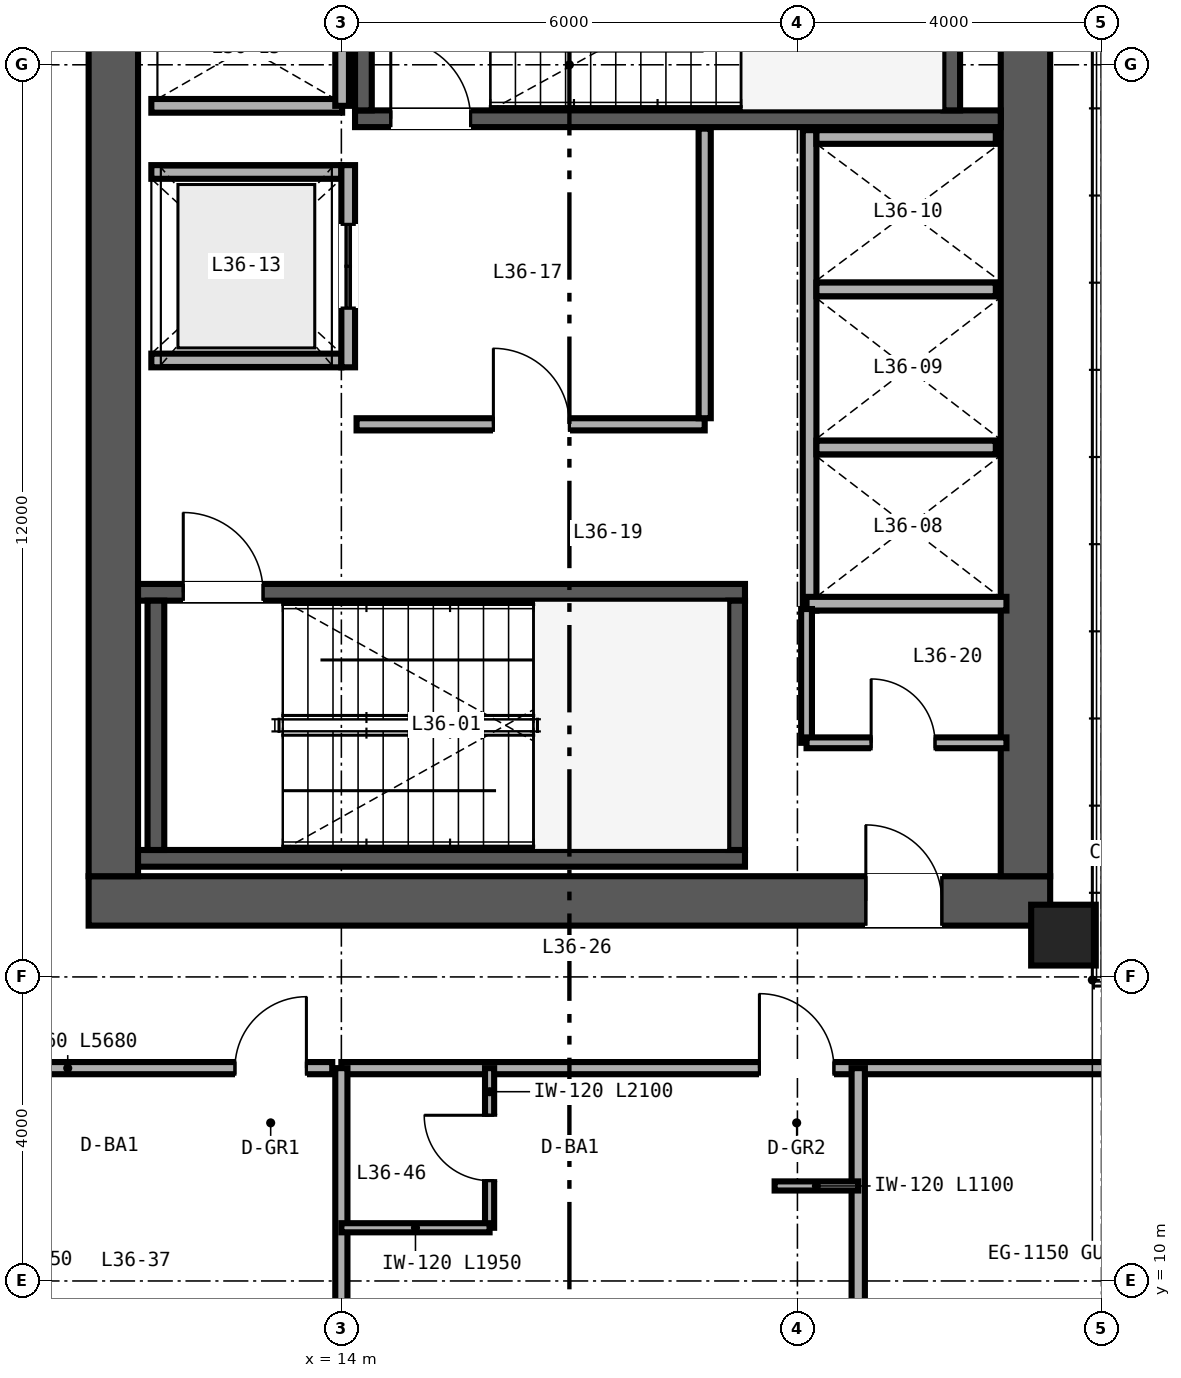
"""IFC4 building model, lengths in metres.
Left out: names, types, materials, properties, quantities, classifications, styles, units other than length and angle.
Written with IfcOpenShell. Run it as: python <this file> out.ifc"""

import sys

from ifc_helpers import new_model, si_unit, direction, frame, frame_2d, origin, origin_2d, place, context, subcontext, project, spatial, rectangle, hollow_rectangle, extrude, source, transform, mapped, element, fill, save


model = new_model("IFC4")
c1 = context("Model", 3, precision=1e-05, world=origin(), true_north=direction((0.0, 1.0)))
c2 = subcontext(c1, "Body", "Model", "MODEL_VIEW")
j1 = project(units=[si_unit("LENGTHUNIT", "METRE"), si_unit("PLANEANGLEUNIT", "RADIAN")], contexts=[c1])
p1 = place(None, origin())
s1 = spatial("IfcSite", under=j1, at=p1, CompositionType="ELEMENT")
p2 = place(p1, origin())
s2 = spatial("IfcBuilding", under=s1, at=p2, CompositionType="ELEMENT")
p3 = place(p2, frame((0.0, 0.0, 144.0)))
s3 = spatial("IfcBuildingStorey", under=s2, at=p3, CompositionType="ELEMENT", Elevation=144.0)
p4 = place(p3, frame((10.675, 15.0, 0.0), z_axis=(0.0, 0.0, 1.0), x_axis=(1.0, 0.0, 0.0)))
e1 = element("IfcWall", 1, at=p4, inside=s3, PredefinedType="SHEAR", context=c2, shape_type="SweptSolid", body=[
    extrude(rectangle(XDim=12.65, YDim=0.65, at=frame_2d((6.325, 0.0))), origin(), (0.0, 0.0, 1.0), 3.36),
])
p5 = place(p4, frame((10.225, 0.0, 0.0)))
e2 = element("IfcOpeningElement", 2, at=p5, cuts=e1, PredefinedType="OPENING", context=c2, shape_type="SweptSolid", body=[
    extrude(rectangle(XDim=1.0, YDim=2.15, at=frame_2d((0.5, 1.075))), frame((0.0, 0.335, 0.0), z_axis=(0.0, -1.0, 0.0), x_axis=(1.0, 0.0, 0.0)), (0.0, 0.0, 1.0), 0.67),
])
for number, where, z_axis, x_axis in (
    (3, (11.0, 15.325, 0.0), (0.0, 0.0, 1.0), (0.0, 1.0, 0.0)),
    (4, (23.0, 15.325, 0.0), (0.0, 0.0, 1.0), (0.0, 1.0, 0.0)),
):
    element("IfcWall", number, at=place(p3, frame(where, z_axis=z_axis, x_axis=x_axis)), inside=s3, PredefinedType="SHEAR", context=c2, shape_type="SweptSolid", body=[
        extrude(rectangle(XDim=21.35, YDim=0.65, at=frame_2d((10.675, 0.0))), origin(), (0.0, 0.0, 1.0), 3.36),
    ])
p6 = place(p3, frame((11.325, 15.56, 0.0), z_axis=(0.0, 0.0, 1.0), x_axis=(1.0, 0.0, 0.0)))
e5 = element("IfcWall", 5, at=p6, inside=s3, PredefinedType="SHEAR", context=c2, shape_type="SweptSolid", body=[
    extrude(rectangle(XDim=7.985, YDim=0.22, at=frame_2d((3.993, 0.0))), origin(), (0.0, 0.0, 1.0), 3.4),
])
p7 = place(p3, frame((11.325, 19.06, 0.0), z_axis=(0.0, 0.0, 1.0), x_axis=(1.0, 0.0, 0.0)))
e6 = element("IfcWall", 6, at=p7, inside=s3, PredefinedType="SHEAR", context=c2, shape_type="SweptSolid", body=[
    extrude(rectangle(XDim=7.985, YDim=0.22, at=frame_2d((3.993, 0.0))), origin(), (0.0, 0.0, 1.0), 3.4),
])
p8 = place(p7, frame((0.595, 0.0, 0.0)))
e7 = element("IfcOpeningElement", 7, at=p8, cuts=e6, PredefinedType="OPENING", context=c2, shape_type="SweptSolid", body=[
    extrude(rectangle(XDim=1.05, YDim=2.15, at=frame_2d((0.525, 1.075))), frame((0.0, 0.12, 0.0), z_axis=(0.0, -1.0, 0.0), x_axis=(1.0, 0.0, 0.0)), (0.0, 0.0, 1.0), 0.24),
])
for number, where, z_axis, x_axis in (
    (8, (11.56, 15.67, 0.0), (0.0, 0.0, 1.0), (0.0, 1.0, 0.0)),
    (9, (19.2, 15.67, 0.0), (0.0, 0.0, 1.0), (0.0, 1.0, 0.0)),
):
    element("IfcWall", number, at=place(p3, frame(where, z_axis=z_axis, x_axis=x_axis)), inside=s3, PredefinedType="SHEAR", context=c2, shape_type="SweptSolid", body=[
        extrude(rectangle(XDim=3.28, YDim=0.22, at=frame_2d((1.64, 0.0))), origin(), (0.0, 0.0, 1.0), 3.4),
    ])
p9 = place(p3, frame((14.18, 25.29, 0.0), z_axis=(0.0, 0.0, 1.0), x_axis=(1.0, 0.0, 0.0)))
e10 = element("IfcWall", 10, at=p9, inside=s3, PredefinedType="SHEAR", context=c2, shape_type="SweptSolid", body=[
    extrude(rectangle(XDim=8.495, YDim=0.22, at=frame_2d((4.248, 0.0))), origin(), (0.0, 0.0, 1.0), 3.4),
])
p10 = place(p9, frame((0.47, 0.0, 0.0)))
e11 = element("IfcOpeningElement", 11, at=p10, cuts=e10, PredefinedType="OPENING", context=c2, shape_type="SweptSolid", body=[
    extrude(rectangle(XDim=1.05, YDim=2.15, at=frame_2d((0.525, 1.075))), frame((0.0, 0.12, 0.0), z_axis=(0.0, -1.0, 0.0), x_axis=(1.0, 0.0, 0.0)), (0.0, 0.0, 1.0), 0.24),
])
for number, where, z_axis, x_axis in (
    (12, (14.29, 25.4, 0.0), (0.0, 0.0, 1.0), (0.0, 1.0, 0.0)),
    (13, (22.03, 25.4, 0.0), (0.0, 0.0, 1.0), (0.0, 1.0, 0.0)),
):
    element("IfcWall", number, at=place(p3, frame(where, z_axis=z_axis, x_axis=x_axis)), inside=s3, PredefinedType="SHEAR", context=c2, shape_type="SweptSolid", body=[
        extrude(rectangle(XDim=3.28, YDim=0.22, at=frame_2d((1.64, 0.0))), origin(), (0.0, 0.0, 1.0), 3.4),
    ])
m1 = source(origin(), c2, "Body", "SweptSolid", [
    extrude(hollow_rectangle(XDim=0.85, YDim=0.8, WallThickness=0.032, at=origin_2d()), origin(), (0.0, 0.0, 1.0), 3.36),
])
p11 = place(p3, frame((23.5, 14.55, 0.0), z_axis=(0.0, 0.0, 1.0), x_axis=(1.0, 0.0, 0.0)))
e14 = element("IfcColumn", 14, at=p11, inside=s3, PredefinedType="COLUMN", context=c2, shape_type="MappedRepresentation", body=[
    mapped(m1, transform((0.0, 0.0, 0.0), scale=1.0)),
])
p12 = place(p3, frame((20.16, 18.82, 0.0), z_axis=(0.0, 0.0, 1.0), x_axis=(0.0, 1.0, 0.0)))
e15 = element("IfcWall", 15, at=p12, inside=s3, PredefinedType="SOLIDWALL", context=c2, shape_type="SweptSolid", body=[
    extrude(rectangle(XDim=6.32, YDim=0.18, at=frame_2d((3.16, 0.0))), origin(), (0.0, 0.0, 1.0), 2.36),
])
p13 = place(p3, frame((20.12, 18.91, 0.0), z_axis=(0.0, 0.0, 1.0), x_axis=(1.0, 0.0, 0.0)))
e16 = element("IfcWall", 16, at=p13, inside=s3, PredefinedType="SOLIDWALL", context=c2, shape_type="SweptSolid", body=[
    extrude(rectangle(XDim=2.63, YDim=0.18, at=frame_2d((1.315, 0.0))), origin(), (0.0, 0.0, 1.0), 3.36),
])
p14 = place(p3, frame((20.25, 25.05, 0.0), z_axis=(0.0, 0.0, 1.0), x_axis=(1.0, 0.0, 0.0)))
e17 = element("IfcWall", 17, at=p14, inside=s3, PredefinedType="SOLIDWALL", context=c2, shape_type="SweptSolid", body=[
    extrude(rectangle(XDim=2.36, YDim=0.18, at=frame_2d((1.18, 0.0))), origin(), (0.0, 0.0, 1.0), 3.36),
])
p15 = place(p3, frame((20.25, 20.965, 0.0), z_axis=(0.0, 0.0, 1.0), x_axis=(1.0, 0.0, 0.0)))
e18 = element("IfcWall", 18, at=p15, inside=s3, PredefinedType="SOLIDWALL", context=c2, shape_type="SweptSolid", body=[
    extrude(rectangle(XDim=2.36, YDim=0.18, at=frame_2d((1.18, 0.0))), origin(), (0.0, 0.0, 1.0), 2.36),
])
p16 = place(p3, frame((20.25, 23.045, 0.0), z_axis=(0.0, 0.0, 1.0), x_axis=(1.0, 0.0, 0.0)))
e19 = element("IfcWall", 19, at=p16, inside=s3, PredefinedType="SOLIDWALL", context=c2, shape_type="SweptSolid", body=[
    extrude(rectangle(XDim=2.36, YDim=0.18, at=frame_2d((1.18, 0.0))), origin(), (0.0, 0.0, 1.0), 3.36),
])
for number, where, z_axis, x_axis in (
    (20, (11.5, 22.11, 0.0), (0.0, 0.0, 1.0), (1.0, 0.0, 0.0)),
    (21, (11.5, 24.59, 0.0), (0.0, 0.0, 1.0), (1.0, 0.0, 0.0)),
):
    element("IfcWall", number, at=place(p3, frame(where, z_axis=z_axis, x_axis=x_axis)), inside=s3, PredefinedType="SOLIDWALL", context=c2, shape_type="SweptSolid", body=[
        extrude(rectangle(XDim=2.5, YDim=0.18, at=frame_2d((1.25, 0.0))), origin(), (0.0, 0.0, 1.0), 3.36),
    ])
p17 = place(p3, frame((14.09, 22.02, 0.0), z_axis=(0.0, 0.0, 1.0), x_axis=(0.0, 1.0, 0.0)))
e22 = element("IfcWall", 22, at=p17, inside=s3, PredefinedType="SOLIDWALL", context=c2, shape_type="SweptSolid", body=[
    extrude(rectangle(XDim=2.66, YDim=0.18, at=frame_2d((1.33, 0.0))), origin(), (0.0, 0.0, 1.0), 3.36),
])
p18 = place(p17, frame((0.78, 0.0, 0.0)))
e23 = element("IfcOpeningElement", 23, at=p18, cuts=e22, PredefinedType="OPENING", context=c2, shape_type="SweptSolid", body=[
    extrude(rectangle(XDim=1.1, YDim=2.2, at=frame_2d((0.55, 1.1))), frame((0.0, 0.1, 0.0), z_axis=(0.0, -1.0, 0.0), x_axis=(1.0, 0.0, 0.0)), (0.0, 0.0, 1.0), 0.2),
])
p19 = place(p3, frame((11.5, 25.46, 0.0), z_axis=(0.0, 0.0, 1.0), x_axis=(1.0, 0.0, 0.0)))
e24 = element("IfcWall", 24, at=p19, inside=s3, PredefinedType="SOLIDWALL", context=c2, shape_type="SweptSolid", body=[
    extrude(rectangle(XDim=2.51, YDim=0.18, at=frame_2d((1.255, 0.0))), origin(), (0.0, 0.0, 1.0), 3.36),
])
p20 = place(p3, frame((14.01, 25.46, 0.0), z_axis=(0.0, 0.0, 1.0), x_axis=(0.0, 1.0, 0.0)))
e25 = element("IfcWall", 25, at=p20, inside=s3, PredefinedType="SOLIDWALL", context=c2, shape_type="SweptSolid", body=[
    extrude(rectangle(XDim=3.08, YDim=0.18, at=frame_2d((1.54, 0.0))), origin(), (0.0, 0.0, 1.0), 3.36),
])
p21 = place(p3, frame((14.2, 21.27, 0.0), z_axis=(0.0, 0.0, 1.0), x_axis=(1.0, 0.0, 0.0)))
e26 = element("IfcWall", 26, at=p21, inside=s3, PredefinedType="PARTITIONING", context=c2, shape_type="SweptSolid", body=[
    extrude(rectangle(XDim=4.58, YDim=0.16, at=frame_2d((2.29, 0.0))), origin(), (0.0, 0.0, 1.0), 3.36),
])
p22 = place(p21, frame((1.8, 0.0, 0.0)))
e27 = element("IfcOpeningElement", 27, at=p22, cuts=e26, PredefinedType="OPENING", context=c2, shape_type="SweptSolid", body=[
    extrude(rectangle(XDim=1.0, YDim=2.15, at=frame_2d((0.5, 1.075))), frame((0.0, 0.09, 0.0), z_axis=(0.0, -1.0, 0.0), x_axis=(1.0, 0.0, 0.0)), (0.0, 0.0, 1.0), 0.18),
])
p23 = place(p3, frame((18.78, 21.35, 0.0), z_axis=(0.0, 0.0, 1.0), x_axis=(0.0, 1.0, 0.0)))
e28 = element("IfcWall", 28, at=p23, inside=s3, PredefinedType="PARTITIONING", context=c2, shape_type="SweptSolid", body=[
    extrude(rectangle(XDim=3.81, YDim=0.16, at=frame_2d((1.905, 0.0))), origin(), (0.0, 0.0, 1.0), 3.36),
])
p24 = place(p3, frame((20.12, 17.08, 0.0), z_axis=(0.0, 0.0, 1.0), x_axis=(0.0, 1.0, 0.0)))
e29 = element("IfcWall", 29, at=p24, inside=s3, PredefinedType="PARTITIONING", context=c2, shape_type="SweptSolid", body=[
    extrude(rectangle(XDim=1.76, YDim=0.142, at=frame_2d((0.88, 0.0))), origin(), (0.0, 0.0, 1.0), 3.36),
])
p25 = place(p3, frame((20.12, 17.08, 0.0), z_axis=(0.0, 0.0, 1.0), x_axis=(1.0, 0.0, 0.0)))
e30 = element("IfcWall", 30, at=p25, inside=s3, PredefinedType="PARTITIONING", context=c2, shape_type="SweptSolid", body=[
    extrude(rectangle(XDim=2.63, YDim=0.142, at=frame_2d((1.315, 0.0))), origin(), (0.0, 0.0, 1.0), 3.36),
])
p26 = place(p25, frame((0.85, 0.0, 0.0)))
e31 = element("IfcOpeningElement", 31, at=p26, cuts=e30, PredefinedType="OPENING", context=c2, shape_type="SweptSolid", body=[
    extrude(rectangle(XDim=0.84, YDim=2.1, at=frame_2d((0.42, 1.05))), frame((0.0, 0.081, 0.0), z_axis=(0.0, -1.0, 0.0), x_axis=(1.0, 0.0, 0.0)), (0.0, 0.0, 1.0), 0.162),
])
p27 = place(p3, frame((8.2, 12.8, 0.0), z_axis=(0.0, 0.0, 1.0), x_axis=(1.0, 0.0, 0.0)))
e32 = element("IfcWall", 32, at=p27, inside=s3, PredefinedType="PARTITIONING", context=c2, shape_type="SweptSolid", body=[
    extrude(rectangle(XDim=5.68, YDim=0.16, at=frame_2d((2.84, 0.0))), origin(), (0.0, 0.0, 1.0), 3.36),
])
p28 = place(p27, frame((4.4, 0.0, 0.0)))
e33 = element("IfcOpeningElement", 33, at=p28, cuts=e32, PredefinedType="OPENING", context=c2, shape_type="SweptSolid", body=[
    extrude(rectangle(XDim=0.94, YDim=2.15, at=frame_2d((0.47, 1.075))), frame((0.0, 0.09, 0.0), z_axis=(0.0, -1.0, 0.0), x_axis=(1.0, 0.0, 0.0)), (0.0, 0.0, 1.0), 0.18),
])
p29 = place(p3, frame((14.0, 12.8, 0.0), z_axis=(0.0, 0.0, 1.0), x_axis=(1.0, 0.0, 0.0)))
e34 = element("IfcWall", 34, at=p29, inside=s3, PredefinedType="PARTITIONING", context=c2, shape_type="SweptSolid", body=[
    extrude(rectangle(XDim=36.0, YDim=0.16, at=frame_2d((18.0, 0.0))), origin(), (0.0, 0.0, 1.0), 2.581),
])
p30 = place(p29, frame((5.5, 0.0, 0.0)))
e35 = element("IfcOpeningElement", 35, at=p30, cuts=e34, PredefinedType="OPENING", context=c2, shape_type="SweptSolid", body=[
    extrude(rectangle(XDim=0.98, YDim=2.2, at=frame_2d((0.49, 1.1))), frame((0.0, 0.09, 0.0), z_axis=(0.0, -1.0, 0.0), x_axis=(1.0, 0.0, 0.0)), (0.0, 0.0, 1.0), 0.18),
])
p31 = place(p29, frame((10.2, 0.0, 0.0)))
e36 = element("IfcOpeningElement", 36, at=p31, cuts=e34, PredefinedType="OPENING", context=c2, shape_type="SweptSolid", body=[
    extrude(rectangle(XDim=0.96, YDim=2.15, at=frame_2d((0.48, 1.075))), frame((0.0, 0.09, 0.0), z_axis=(0.0, -1.0, 0.0), x_axis=(1.0, 0.0, 0.0)), (0.0, 0.0, 1.0), 0.18),
])
p32 = place(p29, frame((16.72, 0.0, 0.0)))
e37 = element("IfcOpeningElement", 37, at=p32, cuts=e34, PredefinedType="OPENING", context=c2, shape_type="SweptSolid", body=[
    extrude(rectangle(XDim=0.96, YDim=2.15, at=frame_2d((0.48, 1.075))), frame((0.0, 0.09, 0.0), z_axis=(0.0, -1.0, 0.0), x_axis=(1.0, 0.0, 0.0)), (0.0, 0.0, 1.0), 0.18),
])
p33 = place(p29, frame((27.14, 0.0, 0.0)))
e38 = element("IfcOpeningElement", 38, at=p33, cuts=e34, PredefinedType="OPENING", context=c2, shape_type="SweptSolid", body=[
    extrude(rectangle(XDim=0.94, YDim=2.15, at=frame_2d((0.47, 1.075))), frame((0.0, 0.09, 0.0), z_axis=(0.0, -1.0, 0.0), x_axis=(1.0, 0.0, 0.0)), (0.0, 0.0, 1.0), 0.18),
])
p34 = place(p29, frame((34.74, 0.0, 0.0)))
e39 = element("IfcOpeningElement", 39, at=p34, cuts=e34, PredefinedType="OPENING", context=c2, shape_type="SweptSolid", body=[
    extrude(rectangle(XDim=0.94, YDim=2.15, at=frame_2d((0.47, 1.075))), frame((0.0, 0.09, 0.0), z_axis=(0.0, -1.0, 0.0), x_axis=(1.0, 0.0, 0.0)), (0.0, 0.0, 1.0), 0.18),
])
p35 = place(p3, frame((14.0, 2.36, 0.0), z_axis=(0.0, 0.0, 1.0), x_axis=(0.0, 1.0, 0.0)))
e40 = element("IfcWall", 40, at=p35, inside=s3, PredefinedType="PARTITIONING", context=c2, shape_type="SweptSolid", body=[
    extrude(rectangle(XDim=10.44, YDim=0.16, at=frame_2d((5.22, 0.0))), origin(), (0.0, 0.0, 1.0), 2.667),
])
p36 = place(p3, frame((20.8, 2.36, 0.0), z_axis=(0.0, 0.0, 1.0), x_axis=(0.0, 1.0, 0.0)))
e41 = element("IfcWall", 41, at=p36, inside=s3, PredefinedType="PARTITIONING", context=c2, shape_type="SweptSolid", body=[
    extrude(rectangle(XDim=10.44, YDim=0.175, at=frame_2d((5.22, 0.0))), origin(), (0.0, 0.0, 1.0), 2.823),
])
p37 = place(p3, frame((15.95, 10.7, 0.0), z_axis=(0.0, 0.0, 1.0), x_axis=(0.0, 1.0, 0.0)))
e42 = element("IfcWall", 42, at=p37, inside=s3, PredefinedType="PARTITIONING", context=c2, shape_type="SweptSolid", body=[
    extrude(rectangle(XDim=2.1, YDim=0.12, at=frame_2d((1.05, 0.0))), origin(), (0.0, 0.0, 1.0), 3.36),
])
p38 = place(p37, frame((0.62, 0.0, 0.0)))
e43 = element("IfcOpeningElement", 43, at=p38, cuts=e42, PredefinedType="OPENING", context=c2, shape_type="SweptSolid", body=[
    extrude(rectangle(XDim=0.86, YDim=2.1, at=frame_2d((0.43, 1.05))), frame((0.0, 0.07, 0.0), z_axis=(0.0, -1.0, 0.0), x_axis=(1.0, 0.0, 0.0)), (0.0, 0.0, 1.0), 0.14),
])
p39 = place(p3, frame((14.0, 10.7, 0.0), z_axis=(0.0, 0.0, 1.0), x_axis=(1.0, 0.0, 0.0)))
e44 = element("IfcWall", 44, at=p39, inside=s3, PredefinedType="PARTITIONING", context=c2, shape_type="SweptSolid", body=[
    extrude(rectangle(XDim=1.95, YDim=0.12, at=frame_2d((0.975, 0.0))), origin(), (0.0, 0.0, 1.0), 3.36),
])
p40 = place(p3, frame((19.7, 11.25, 0.0), z_axis=(0.0, 0.0, 1.0), x_axis=(1.0, 0.0, 0.0)))
e45 = element("IfcWall", 45, at=p40, inside=s3, PredefinedType="PARTITIONING", context=c2, shape_type="SweptSolid", body=[
    extrude(rectangle(XDim=1.1, YDim=0.12, at=frame_2d((0.55, 0.0))), origin(), (0.0, 0.0, 1.0), 3.36),
])
m2 = source(origin(), c2, "Body", "SweptSolid", [
    extrude(rectangle(XDim=1.05, YDim=2.15, at=frame_2d((0.525, 1.075))), frame((0.0, 0.025, 0.0), z_axis=(0.0, -1.0, 0.0), x_axis=(1.0, 0.0, 0.0)), (0.0, 0.0, 1.0), 0.05),
])
p41 = place(p8, origin())
e46 = element("IfcDoor", 46, at=p41, inside=s3, OperationType="SINGLE_SWING_LEFT", PredefinedType="DOOR", context=c2, shape_type="MappedRepresentation", body=[
    mapped(m2, transform((0.0, 0.0, 0.0), scale=1.0)),
])
fill(e7, e46)
p42 = place(p10, origin())
e47 = element("IfcDoor", 47, at=p42, inside=s3, OperationType="SINGLE_SWING_LEFT", PredefinedType="DOOR", context=c2, shape_type="MappedRepresentation", body=[
    mapped(m2, transform((0.0, 0.0, 0.0), scale=1.0)),
])
fill(e11, e47)
m3 = source(origin(), c2, "Body", "SweptSolid", [
    extrude(rectangle(XDim=1.1, YDim=2.2, at=frame_2d((0.55, 1.1))), frame((0.0, 0.025, 0.0), z_axis=(0.0, -1.0, 0.0), x_axis=(1.0, 0.0, 0.0)), (0.0, 0.0, 1.0), 0.05),
])
p43 = place(p18, origin())
e48 = element("IfcDoor", 48, at=p43, inside=s3, OperationType="DOUBLE_DOOR_SLIDING", PredefinedType="DOOR", context=c2, shape_type="MappedRepresentation", body=[
    mapped(m3, transform((0.0, 0.0, 0.0), scale=1.0)),
])
fill(e23, e48)
m4 = source(origin(), c2, "Body", "SweptSolid", [
    extrude(rectangle(XDim=1.0, YDim=2.15, at=frame_2d((0.5, 1.075))), frame((0.0, 0.025, 0.0), z_axis=(0.0, -1.0, 0.0), x_axis=(1.0, 0.0, 0.0)), (0.0, 0.0, 1.0), 0.05),
])
p44 = place(p22, origin())
e49 = element("IfcDoor", 49, at=p44, inside=s3, OperationType="SINGLE_SWING_LEFT", PredefinedType="DOOR", context=c2, shape_type="MappedRepresentation", body=[
    mapped(m4, transform((0.0, 0.0, 0.0), scale=1.0)),
])
fill(e27, e49)
m5 = source(origin(), c2, "Body", "SweptSolid", [
    extrude(rectangle(XDim=0.84, YDim=2.1, at=frame_2d((0.42, 1.05))), frame((0.0, 0.025, 0.0), z_axis=(0.0, -1.0, 0.0), x_axis=(1.0, 0.0, 0.0)), (0.0, 0.0, 1.0), 0.05),
])
p45 = place(p26, origin())
e50 = element("IfcDoor", 50, at=p45, inside=s3, OperationType="SINGLE_SWING_LEFT", PredefinedType="DOOR", context=c2, shape_type="MappedRepresentation", body=[
    mapped(m5, transform((0.0, 0.0, 0.0), scale=1.0)),
])
fill(e31, e50)
p46 = place(p5, origin())
e51 = element("IfcDoor", 51, at=p46, inside=s3, OperationType="SINGLE_SWING_LEFT", PredefinedType="DOOR", context=c2, shape_type="MappedRepresentation", body=[
    mapped(m4, transform((0.0, 0.0, 0.0), scale=1.0)),
])
fill(e2, e51)
m6 = source(origin(), c2, "Body", "SweptSolid", [
    extrude(rectangle(XDim=0.94, YDim=2.15, at=frame_2d((0.47, 1.075))), frame((0.0, 0.025, 0.0), z_axis=(0.0, -1.0, 0.0), x_axis=(1.0, 0.0, 0.0)), (0.0, 0.0, 1.0), 0.05),
])
p47 = place(p28, origin())
e52 = element("IfcDoor", 52, at=p47, inside=s3, OperationType="SINGLE_SWING_RIGHT", PredefinedType="DOOR", context=c2, shape_type="MappedRepresentation", body=[
    mapped(m6, transform((0.0, 0.0, 0.0), scale=1.0)),
])
fill(e33, e52)
m7 = source(origin(), c2, "Body", "SweptSolid", [
    extrude(rectangle(XDim=0.86, YDim=2.1, at=frame_2d((0.43, 1.05))), frame((0.0, 0.025, 0.0), z_axis=(0.0, -1.0, 0.0), x_axis=(1.0, 0.0, 0.0)), (0.0, 0.0, 1.0), 0.05),
])
p48 = place(p38, origin())
e53 = element("IfcDoor", 53, at=p48, inside=s3, OperationType="SINGLE_SWING_RIGHT", PredefinedType="DOOR", context=c2, shape_type="MappedRepresentation", body=[
    mapped(m7, transform((0.0, 0.0, 0.0), scale=1.0)),
])
fill(e43, e53)
m8 = source(origin(), c2, "Body", "SweptSolid", [
    extrude(rectangle(XDim=0.98, YDim=2.2, at=frame_2d((0.49, 1.1))), frame((0.0, 0.025, 0.0), z_axis=(0.0, -1.0, 0.0), x_axis=(1.0, 0.0, 0.0)), (0.0, 0.0, 1.0), 0.05),
])
p49 = place(p30, origin())
e54 = element("IfcDoor", 54, at=p49, inside=s3, OperationType="SINGLE_SWING_LEFT", PredefinedType="DOOR", context=c2, shape_type="MappedRepresentation", body=[
    mapped(m8, transform((0.0, 0.0, 0.0), scale=1.0)),
])
fill(e35, e54)
save(model, sys.argv[1])
